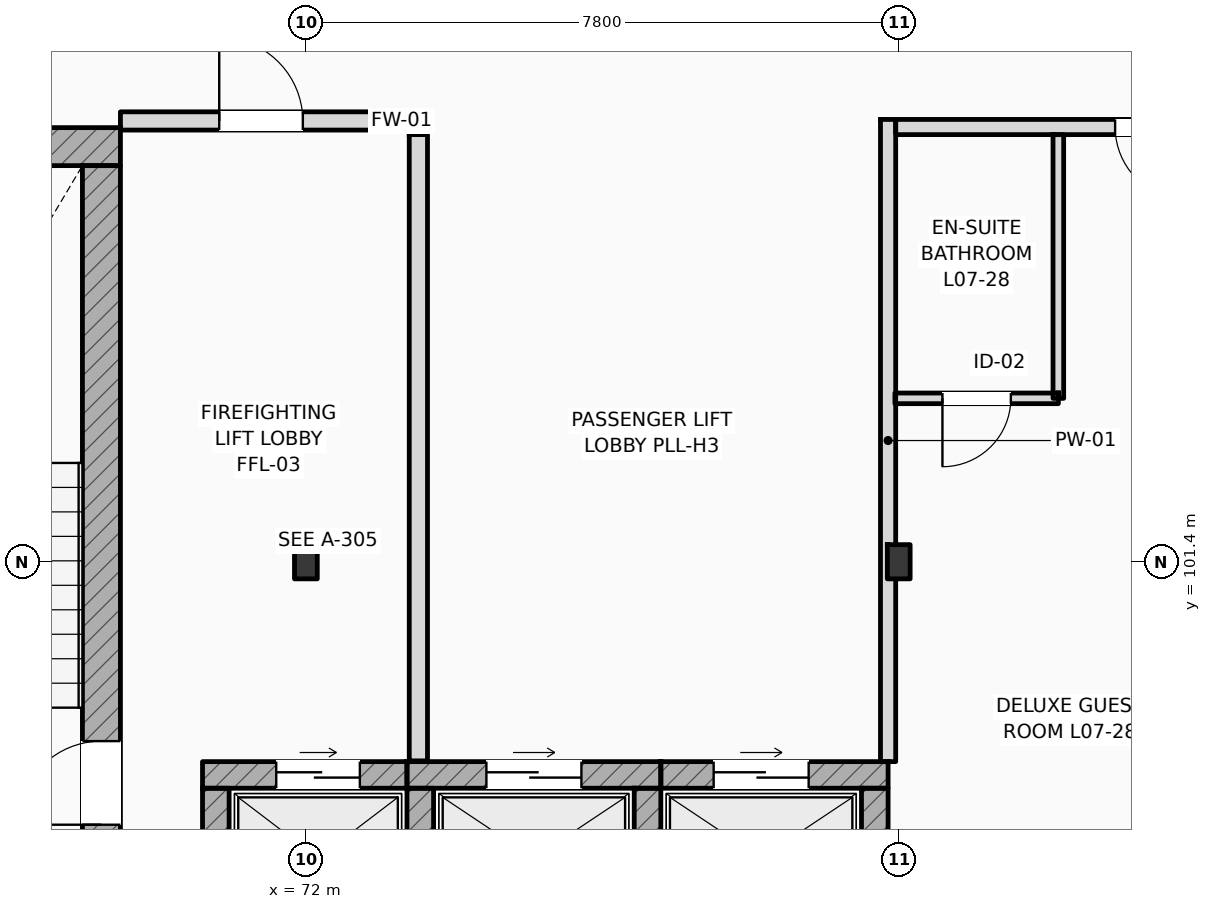
"""IFC4 building model, lengths in metres.
Left out: names, types, materials, properties, quantities, classifications, styles, units other than length and angle.
Written with IfcOpenShell. Run it as: python <this file> out.ifc"""

import sys

from ifc_helpers import new_model, si_unit, direction, frame, frame_2d, origin, origin_2d, place, context, subcontext, project, spatial, rectangle, i_section, extrude, element, fill, save


model = new_model("IFC4")
c1 = context("Model", 3, precision=1e-05, world=origin(), true_north=direction((0.0, 1.0)))
c2 = subcontext(c1, "Body", "Model", "MODEL_VIEW")
j1 = project(units=[si_unit("LENGTHUNIT", "METRE"), si_unit("PLANEANGLEUNIT", "RADIAN")], contexts=[c1])
p1 = place(None, origin())
s1 = spatial("IfcSite", under=j1, at=p1, CompositionType="ELEMENT")
p2 = place(p1, origin())
s2 = spatial("IfcBuilding", under=s1, at=p2, CompositionType="ELEMENT")
p3 = place(p2, frame((0.0, 0.0, 31.8)))
s3 = spatial("IfcBuildingStorey", under=s2, at=p3, CompositionType="ELEMENT", Elevation=31.8)
for number, where, z_axis, x_axis in (
    (1, (72.0, 101.4, 0.0), (0.0, 0.0, 1.0), (1.0, 0.0, 0.0)),
    (2, (79.8, 101.4, 0.0), (0.0, 0.0, 1.0), (1.0, 0.0, 0.0)),
):
    element("IfcColumn", number, at=place(p3, frame(where, z_axis=z_axis, x_axis=x_axis)), inside=s3, PredefinedType="COLUMN", context=c2, shape_type="SweptSolid", body=[
        extrude(i_section(OverallWidth=0.3, OverallDepth=0.45, WebThickness=0.014, FlangeThickness=0.026, FilletRadius=0.027, at=origin_2d()), origin(), (0.0, 0.0, 1.0), 3.6),
    ])
p4 = place(p3, frame((64.4, 106.862, 0.0), z_axis=(0.0, 0.0, 1.0), x_axis=(1.0, 0.0, 0.0)))
e3 = element("IfcWall", 3, at=p4, inside=s3, PredefinedType="SHEAR", context=c2, shape_type="SweptSolid", body=[
    extrude(rectangle(XDim=5.16, YDim=0.5, at=frame_2d((2.58, 0.0))), origin(), (0.0, 0.0, 1.0), 3.6),
])
p5 = place(p3, frame((69.31, 97.5, 0.0), z_axis=(0.0, 0.0, 1.0), x_axis=(0.0, 1.0, 0.0)))
e4 = element("IfcWall", 4, at=p5, inside=s3, PredefinedType="SHEAR", context=c2, shape_type="SweptSolid", body=[
    extrude(rectangle(XDim=9.112, YDim=0.5, at=frame_2d((4.556, 0.0))), origin(), (0.0, 0.0, 1.0), 3.6),
])
p6 = place(p5, frame((0.44, 0.0, 0.0)))
e5 = element("IfcOpeningElement", 5, at=p6, cuts=e4, PredefinedType="OPENING", context=c2, shape_type="SweptSolid", body=[
    extrude(rectangle(XDim=1.1, YDim=2.2, at=frame_2d((0.55, 1.1))), frame((0.0, 0.26, 0.0), z_axis=(0.0, -1.0, 0.0), x_axis=(1.0, 0.0, 0.0)), (0.0, 0.0, 1.0), 0.52),
])
p7 = place(p3, frame((70.64, 98.595, 0.0), z_axis=(0.0, 0.0, 1.0), x_axis=(1.0, 0.0, 0.0)))
e6 = element("IfcWall", 6, at=p7, inside=s3, PredefinedType="SHEAR", context=c2, shape_type="SweptSolid", body=[
    extrude(rectangle(XDim=2.69, YDim=0.35, at=frame_2d((1.345, 0.0))), origin(), (0.0, 0.0, 1.0), 3.36),
])
p8 = place(p7, frame((0.97, 0.0, 0.0)))
e7 = element("IfcOpeningElement", 7, at=p8, cuts=e6, PredefinedType="OPENING", context=c2, shape_type="SweptSolid", body=[
    extrude(rectangle(XDim=1.1, YDim=2.2, at=frame_2d((0.55, 1.1))), frame((0.0, 0.185, 0.0), z_axis=(0.0, -1.0, 0.0), x_axis=(1.0, 0.0, 0.0)), (0.0, 0.0, 1.0), 0.37),
])
p9 = place(p3, frame((70.815, 96.58, 0.0), z_axis=(0.0, 0.0, 1.0), x_axis=(0.0, 1.0, 0.0)))
e8 = element("IfcWall", 8, at=p9, inside=s3, PredefinedType="SHEAR", context=c2, shape_type="SweptSolid", body=[
    extrude(rectangle(XDim=1.84, YDim=0.35, at=frame_2d((0.92, 0.0))), origin(), (0.0, 0.0, 1.0), 3.36),
])
p10 = place(p3, frame((73.33, 98.595, 0.0), z_axis=(0.0, 0.0, 1.0), x_axis=(1.0, 0.0, 0.0)))
e9 = element("IfcWall", 9, at=p10, inside=s3, PredefinedType="SHEAR", context=c2, shape_type="SweptSolid", body=[
    extrude(rectangle(XDim=3.34, YDim=0.35, at=frame_2d((1.67, 0.0))), origin(), (0.0, 0.0, 1.0), 3.36),
])
p11 = place(p10, frame((1.045, 0.0, 0.0)))
e10 = element("IfcOpeningElement", 10, at=p11, cuts=e9, PredefinedType="OPENING", context=c2, shape_type="SweptSolid", body=[
    extrude(rectangle(XDim=1.25, YDim=2.25, at=frame_2d((0.625, 1.125))), frame((0.0, 0.185, 0.0), z_axis=(0.0, -1.0, 0.0), x_axis=(1.0, 0.0, 0.0)), (0.0, 0.0, 1.0), 0.37),
])
for number, where, z_axis, x_axis in (
    (11, (73.505, 96.58, 0.0), (0.0, 0.0, 1.0), (0.0, 1.0, 0.0)),
    (12, (76.495, 96.58, 0.0), (0.0, 0.0, 1.0), (0.0, 1.0, 0.0)),
):
    element("IfcWall", number, at=place(p3, frame(where, z_axis=z_axis, x_axis=x_axis)), inside=s3, PredefinedType="SHEAR", context=c2, shape_type="SweptSolid", body=[
        extrude(rectangle(XDim=1.84, YDim=0.35, at=frame_2d((0.92, 0.0))), origin(), (0.0, 0.0, 1.0), 3.36),
    ])
p12 = place(p3, frame((76.67, 98.595, 0.0), z_axis=(0.0, 0.0, 1.0), x_axis=(1.0, 0.0, 0.0)))
e13 = element("IfcWall", 13, at=p12, inside=s3, PredefinedType="SHEAR", context=c2, shape_type="SweptSolid", body=[
    extrude(rectangle(XDim=2.99, YDim=0.35, at=frame_2d((1.495, 0.0))), origin(), (0.0, 0.0, 1.0), 3.36),
])
p13 = place(p12, frame((0.695, 0.0, 0.0)))
e14 = element("IfcOpeningElement", 14, at=p13, cuts=e13, PredefinedType="OPENING", context=c2, shape_type="SweptSolid", body=[
    extrude(rectangle(XDim=1.25, YDim=2.25, at=frame_2d((0.625, 1.125))), frame((0.0, 0.185, 0.0), z_axis=(0.0, -1.0, 0.0), x_axis=(1.0, 0.0, 0.0)), (0.0, 0.0, 1.0), 0.37),
])
p14 = place(p3, frame((79.485, 96.58, 0.0), z_axis=(0.0, 0.0, 1.0), x_axis=(0.0, 1.0, 0.0)))
e15 = element("IfcWall", 15, at=p14, inside=s3, PredefinedType="SHEAR", context=c2, shape_type="SweptSolid", body=[
    extrude(rectangle(XDim=1.84, YDim=0.35, at=frame_2d((0.92, 0.0))), origin(), (0.0, 0.0, 1.0), 2.99),
])
p15 = place(p3, frame((73.48, 98.78, 0.0), z_axis=(0.0, 0.0, 1.0), x_axis=(0.0, 1.0, 0.0)))
e16 = element("IfcWall", 16, at=p15, inside=s3, PredefinedType="STANDARD", context=c2, shape_type="SweptSolid", body=[
    extrude(rectangle(XDim=8.24, YDim=0.24, at=frame_2d((4.12, 0.0))), origin(), (0.0, 0.0, 1.0), 3.36),
])
p16 = place(p3, frame((69.56, 107.2, 0.0), z_axis=(0.0, 0.0, 1.0), x_axis=(1.0, 0.0, 0.0)))
e17 = element("IfcWall", 17, at=p16, inside=s3, PredefinedType="STANDARD", context=c2, shape_type="SweptSolid", body=[
    extrude(rectangle(XDim=4.1, YDim=0.24, at=frame_2d((2.05, 0.0))), origin(), (0.0, 0.0, 1.0), 3.36),
])
p17 = place(p16, frame((1.3, 0.0, 0.0)))
e18 = element("IfcOpeningElement", 18, at=p17, cuts=e17, PredefinedType="OPENING", context=c2, shape_type="SweptSolid", body=[
    extrude(rectangle(XDim=1.1, YDim=2.2, at=frame_2d((0.55, 1.1))), frame((0.0, 0.13, 0.0), z_axis=(0.0, -1.0, 0.0), x_axis=(1.0, 0.0, 0.0)), (0.0, 0.0, 1.0), 0.26),
])
p18 = place(p3, frame((79.76, 107.12, 0.0), z_axis=(0.0, 0.0, 1.0), x_axis=(1.0, 0.0, 0.0)))
e19 = element("IfcWall", 19, at=p18, inside=s3, PredefinedType="PARTITIONING", context=c2, shape_type="SweptSolid", body=[
    extrude(rectangle(XDim=40.1, YDim=0.2, at=frame_2d((20.05, 0.0))), origin(), (0.0, 0.0, 1.0), 3.36),
])
p19 = place(p18, frame((2.887, 0.0, 0.0)))
e20 = element("IfcOpeningElement", 20, at=p19, cuts=e19, PredefinedType="OPENING", context=c2, shape_type="SweptSolid", body=[
    extrude(rectangle(XDim=0.96, YDim=2.2, at=frame_2d((0.48, 1.1))), frame((0.0, 0.11, 0.0), z_axis=(0.0, -1.0, 0.0), x_axis=(1.0, 0.0, 0.0)), (0.0, 0.0, 1.0), 0.22),
])
p20 = place(p18, frame((5.121, 0.0, 0.0)))
e21 = element("IfcOpeningElement", 21, at=p20, cuts=e19, PredefinedType="OPENING", context=c2, shape_type="SweptSolid", body=[
    extrude(rectangle(XDim=0.96, YDim=2.2, at=frame_2d((0.48, 1.1))), frame((0.0, 0.11, 0.0), z_axis=(0.0, -1.0, 0.0), x_axis=(1.0, 0.0, 0.0)), (0.0, 0.0, 1.0), 0.22),
])
p21 = place(p18, frame((11.698, 0.0, 0.0)))
e22 = element("IfcOpeningElement", 22, at=p21, cuts=e19, PredefinedType="OPENING", context=c2, shape_type="SweptSolid", body=[
    extrude(rectangle(XDim=0.96, YDim=2.2, at=frame_2d((0.48, 1.1))), frame((0.0, 0.11, 0.0), z_axis=(0.0, -1.0, 0.0), x_axis=(1.0, 0.0, 0.0)), (0.0, 0.0, 1.0), 0.22),
])
p22 = place(p18, frame((13.976, 0.0, 0.0)))
e23 = element("IfcOpeningElement", 23, at=p22, cuts=e19, PredefinedType="OPENING", context=c2, shape_type="SweptSolid", body=[
    extrude(rectangle(XDim=0.96, YDim=2.2, at=frame_2d((0.48, 1.1))), frame((0.0, 0.11, 0.0), z_axis=(0.0, -1.0, 0.0), x_axis=(1.0, 0.0, 0.0)), (0.0, 0.0, 1.0), 0.22),
])
p23 = place(p18, frame((20.554, 0.0, 0.0)))
e24 = element("IfcOpeningElement", 24, at=p23, cuts=e19, PredefinedType="OPENING", context=c2, shape_type="SweptSolid", body=[
    extrude(rectangle(XDim=0.96, YDim=2.2, at=frame_2d((0.48, 1.1))), frame((0.0, 0.11, 0.0), z_axis=(0.0, -1.0, 0.0), x_axis=(1.0, 0.0, 0.0)), (0.0, 0.0, 1.0), 0.22),
])
p24 = place(p18, frame((24.982, 0.0, 0.0)))
e25 = element("IfcOpeningElement", 25, at=p24, cuts=e19, PredefinedType="OPENING", context=c2, shape_type="SweptSolid", body=[
    extrude(rectangle(XDim=0.96, YDim=2.2, at=frame_2d((0.48, 1.1))), frame((0.0, 0.11, 0.0), z_axis=(0.0, -1.0, 0.0), x_axis=(1.0, 0.0, 0.0)), (0.0, 0.0, 1.0), 0.22),
])
p25 = place(p18, frame((29.409, 0.0, 0.0)))
e26 = element("IfcOpeningElement", 26, at=p25, cuts=e19, PredefinedType="OPENING", context=c2, shape_type="SweptSolid", body=[
    extrude(rectangle(XDim=0.96, YDim=2.2, at=frame_2d((0.48, 1.1))), frame((0.0, 0.11, 0.0), z_axis=(0.0, -1.0, 0.0), x_axis=(1.0, 0.0, 0.0)), (0.0, 0.0, 1.0), 0.22),
])
p26 = place(p18, frame((33.837, 0.0, 0.0)))
e27 = element("IfcOpeningElement", 27, at=p26, cuts=e19, PredefinedType="OPENING", context=c2, shape_type="SweptSolid", body=[
    extrude(rectangle(XDim=0.96, YDim=2.2, at=frame_2d((0.48, 1.1))), frame((0.0, 0.11, 0.0), z_axis=(0.0, -1.0, 0.0), x_axis=(1.0, 0.0, 0.0)), (0.0, 0.0, 1.0), 0.22),
])
p27 = place(p18, frame((36.027, 0.0, 0.0)))
e28 = element("IfcOpeningElement", 28, at=p27, cuts=e19, PredefinedType="OPENING", context=c2, shape_type="SweptSolid", body=[
    extrude(rectangle(XDim=0.96, YDim=2.2, at=frame_2d((0.48, 1.1))), frame((0.0, 0.11, 0.0), z_axis=(0.0, -1.0, 0.0), x_axis=(1.0, 0.0, 0.0)), (0.0, 0.0, 1.0), 0.22),
])
p28 = place(p3, frame((79.66, 98.77, 0.0), z_axis=(0.0, 0.0, 1.0), x_axis=(0.0, 1.0, 0.0)))
e29 = element("IfcWall", 29, at=p28, inside=s3, PredefinedType="PARTITIONING", context=c2, shape_type="SweptSolid", body=[
    extrude(rectangle(XDim=8.45, YDim=0.2, at=frame_2d((4.225, 0.0))), origin(), (0.0, 0.0, 1.0), 2.99),
])
p29 = place(p3, frame((81.9, 103.55, 0.0), z_axis=(0.0, 0.0, 1.0), x_axis=(0.0, 1.0, 0.0)))
e30 = element("IfcWall", 30, at=p29, inside=s3, PredefinedType="PARTITIONING", context=c2, shape_type="SweptSolid", body=[
    extrude(rectangle(XDim=3.47, YDim=0.14, at=frame_2d((1.735, 0.0))), origin(), (0.0, 0.0, 1.0), 3.36),
])
p30 = place(p3, frame((79.75, 103.55, 0.0), z_axis=(0.0, 0.0, 1.0), x_axis=(1.0, 0.0, 0.0)))
e31 = element("IfcWall", 31, at=p30, inside=s3, PredefinedType="PARTITIONING", context=c2, shape_type="SweptSolid", body=[
    extrude(rectangle(XDim=2.15, YDim=0.14, at=frame_2d((1.075, 0.0))), origin(), (0.0, 0.0, 1.0), 3.36),
])
p31 = place(p30, frame((0.625, 0.0, 0.0)))
e32 = element("IfcOpeningElement", 32, at=p31, cuts=e31, PredefinedType="OPENING", context=c2, shape_type="SweptSolid", body=[
    extrude(rectangle(XDim=0.9, YDim=2.1, at=frame_2d((0.45, 1.05))), frame((0.0, 0.08, 0.0), z_axis=(0.0, -1.0, 0.0), x_axis=(1.0, 0.0, 0.0)), (0.0, 0.0, 1.0), 0.16),
])
p32 = place(p6, origin())
e33 = element("IfcDoor", 33, at=p32, inside=s3, OperationType="SINGLE_SWING_LEFT", PredefinedType="DOOR", context=c2, shape_type="SweptSolid", body=[
    extrude(rectangle(XDim=1.1, YDim=2.2, at=frame_2d((0.55, 1.1))), frame((0.0, 0.025, 0.0), z_axis=(0.0, -1.0, 0.0), x_axis=(1.0, 0.0, 0.0)), (0.0, 0.0, 1.0), 0.05),
])
fill(e5, e33)
p33 = place(p8, origin())
e34 = element("IfcDoor", 34, at=p33, inside=s3, OperationType="SLIDING_TO_LEFT", PredefinedType="DOOR", context=c2, shape_type="SweptSolid", body=[
    extrude(rectangle(XDim=1.1, YDim=2.2, at=frame_2d((0.55, 1.1))), frame((0.0, 0.025, 0.0), z_axis=(0.0, -1.0, 0.0), x_axis=(1.0, 0.0, 0.0)), (0.0, 0.0, 1.0), 0.05),
])
fill(e7, e34)
p34 = place(p11, origin())
e35 = element("IfcDoor", 35, at=p34, inside=s3, OperationType="SLIDING_TO_LEFT", PredefinedType="DOOR", context=c2, shape_type="SweptSolid", body=[
    extrude(rectangle(XDim=1.25, YDim=2.25, at=frame_2d((0.625, 1.125))), frame((0.0, 0.025, 0.0), z_axis=(0.0, -1.0, 0.0), x_axis=(1.0, 0.0, 0.0)), (0.0, 0.0, 1.0), 0.05),
])
fill(e10, e35)
p35 = place(p13, origin())
e36 = element("IfcDoor", 36, at=p35, inside=s3, OperationType="SLIDING_TO_LEFT", PredefinedType="DOOR", context=c2, shape_type="SweptSolid", body=[
    extrude(rectangle(XDim=1.25, YDim=2.25, at=frame_2d((0.625, 1.125))), frame((0.0, 0.025, 0.0), z_axis=(0.0, -1.0, 0.0), x_axis=(1.0, 0.0, 0.0)), (0.0, 0.0, 1.0), 0.05),
])
fill(e14, e36)
p36 = place(p17, origin())
e37 = element("IfcDoor", 37, at=p36, inside=s3, OperationType="SINGLE_SWING_LEFT", PredefinedType="DOOR", context=c2, shape_type="SweptSolid", body=[
    extrude(rectangle(XDim=1.1, YDim=2.2, at=frame_2d((0.55, 1.1))), frame((0.0, 0.025, 0.0), z_axis=(0.0, -1.0, 0.0), x_axis=(1.0, 0.0, 0.0)), (0.0, 0.0, 1.0), 0.05),
])
fill(e18, e37)
p37 = place(p19, frame((0.96, 0.0, 0.0), z_axis=(0.0, 0.0, 1.0), x_axis=(-1.0, 0.0, 0.0)))
e38 = element("IfcDoor", 38, at=p37, inside=s3, OperationType="SINGLE_SWING_RIGHT", PredefinedType="DOOR", context=c2, shape_type="SweptSolid", body=[
    extrude(rectangle(XDim=0.96, YDim=2.2, at=frame_2d((0.48, 1.1))), frame((0.0, 0.025, 0.0), z_axis=(0.0, -1.0, 0.0), x_axis=(1.0, 0.0, 0.0)), (0.0, 0.0, 1.0), 0.05),
])
fill(e20, e38)
p38 = place(p31, frame((0.9, 0.0, 0.0), z_axis=(0.0, 0.0, 1.0), x_axis=(-1.0, 0.0, 0.0)))
e39 = element("IfcDoor", 39, at=p38, inside=s3, OperationType="SINGLE_SWING_LEFT", PredefinedType="DOOR", context=c2, shape_type="SweptSolid", body=[
    extrude(rectangle(XDim=0.9, YDim=2.1, at=frame_2d((0.45, 1.05))), frame((0.0, 0.025, 0.0), z_axis=(0.0, -1.0, 0.0), x_axis=(1.0, 0.0, 0.0)), (0.0, 0.0, 1.0), 0.05),
])
fill(e32, e39)
save(model, sys.argv[1])
